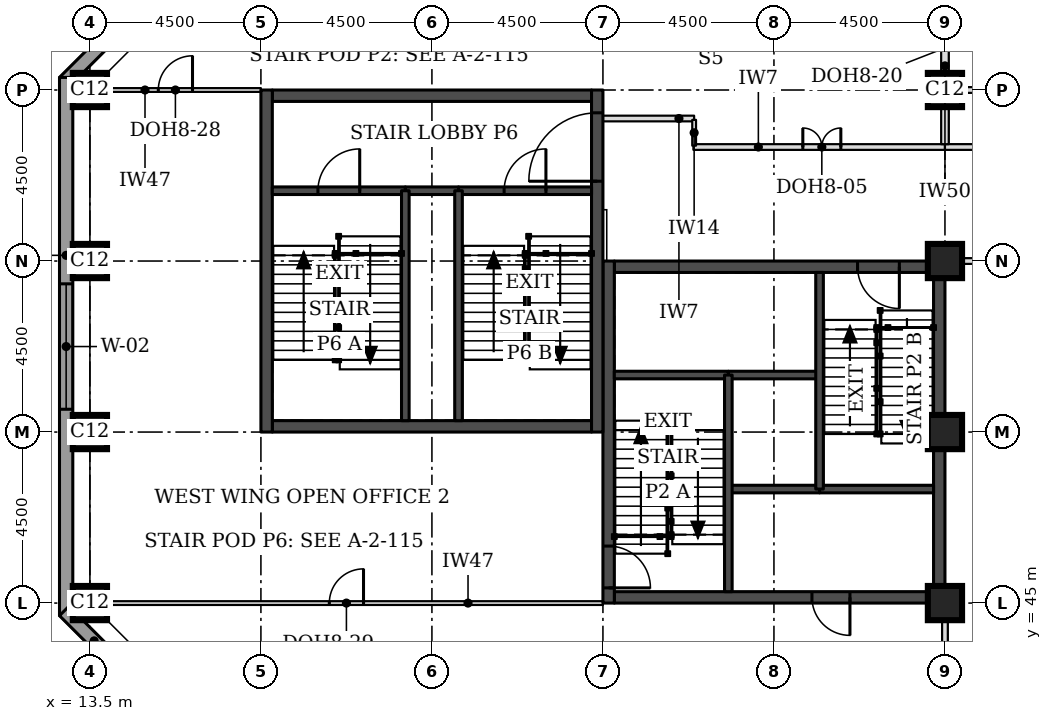
"""IFC4 building model, lengths in metres.
Left out: names, types, materials, properties, quantities, classifications, styles, units other than length and angle.
Written with IfcOpenShell. Run it as: python <this file> out.ifc"""

import sys

from ifc_helpers import new_model, si_unit, direction, frame, frame_2d, origin, origin_2d, place, context, subcontext, project, spatial, rectangle, extrude, element, fill, save


model = new_model("IFC4")
c1 = context("Model", 3, precision=1e-05, world=origin(), true_north=direction((0.0, 1.0)))
c2 = subcontext(c1, "Body", "Model", "MODEL_VIEW")
j1 = project(units=[si_unit("LENGTHUNIT", "METRE"), si_unit("PLANEANGLEUNIT", "RADIAN")], contexts=[c1])
p1 = place(None, origin())
s1 = spatial("IfcSite", under=j1, at=p1, CompositionType="ELEMENT")
p2 = place(p1, origin())
s2 = spatial("IfcBuilding", under=s1, at=p2, CompositionType="ELEMENT")
p3 = place(p2, frame((0.0, 0.0, 203.2)))
s3 = spatial("IfcBuildingStorey", under=s2, at=p3, CompositionType="ELEMENT", Elevation=203.2)
for number, where, z_axis, x_axis in (
    (1, (13.5, 45.0, 0.0), (0.0, 0.0, 1.0), (1.0, 0.0, 0.0)),
    (2, (36.0, 45.0, 0.0), (0.0, 0.0, 1.0), (1.0, 0.0, 0.0)),
    (3, (13.5, 49.5, 0.0), (0.0, 0.0, 1.0), (1.0, 0.0, 0.0)),
    (4, (36.0, 49.5, 0.0), (0.0, 0.0, 1.0), (1.0, 0.0, 0.0)),
    (5, (13.5, 54.0, 0.0), (0.0, 0.0, 1.0), (1.0, 0.0, 0.0)),
    (6, (36.0, 54.0, 0.0), (0.0, 0.0, 1.0), (1.0, 0.0, 0.0)),
    (7, (13.5, 58.5, 0.0), (0.0, 0.0, 1.0), (1.0, 0.0, 0.0)),
    (8, (36.0, 58.5, 0.0), (0.0, 0.0, 1.0), (1.0, 0.0, 0.0)),
):
    element("IfcColumn", number, at=place(p3, frame(where, z_axis=z_axis, x_axis=x_axis)), inside=s3, PredefinedType="COLUMN", context=c2, shape_type="SweptSolid", body=[
        extrude(rectangle(XDim=0.9, YDim=0.9, at=origin_2d()), origin(), (0.0, 0.0, 1.0), 3.7),
    ])
p4 = place(p3, frame((27.3, 45.15, 0.0), z_axis=(0.0, 0.0, 1.0), x_axis=(1.0, 0.0, 0.0)))
e9 = element("IfcWall", 9, at=p4, inside=s3, PredefinedType="SHEAR", context=c2, shape_type="SweptSolid", body=[
    extrude(rectangle(XDim=8.4, YDim=0.3, at=frame_2d((4.2, 0.0))), origin(), (0.0, 0.0, 1.0), 3.7),
])
p5 = place(p4, frame((5.2, 0.0, 0.0)))
e10 = element("IfcOpeningElement", 10, at=p5, cuts=e9, PredefinedType="OPENING", context=c2, shape_type="SweptSolid", body=[
    extrude(rectangle(XDim=1.0, YDim=2.1, at=frame_2d((0.5, 1.05))), frame((0.0, 0.16, 0.0), z_axis=(0.0, -1.0, 0.0), x_axis=(1.0, 0.0, 0.0)), (0.0, 0.0, 1.0), 0.32),
])
p6 = place(p3, frame((27.3, 53.85, 0.0), z_axis=(0.0, 0.0, 1.0), x_axis=(1.0, 0.0, 0.0)))
e11 = element("IfcWall", 11, at=p6, inside=s3, PredefinedType="SHEAR", context=c2, shape_type="SweptSolid", body=[
    extrude(rectangle(XDim=8.4, YDim=0.3, at=frame_2d((4.2, 0.0))), origin(), (0.0, 0.0, 1.0), 3.7),
])
p7 = place(p6, frame((6.4, 0.0, 0.0)))
e12 = element("IfcOpeningElement", 12, at=p7, cuts=e11, PredefinedType="OPENING", context=c2, shape_type="SweptSolid", body=[
    extrude(rectangle(XDim=1.1, YDim=2.1, at=frame_2d((0.55, 1.05))), frame((0.0, 0.16, 0.0), z_axis=(0.0, -1.0, 0.0), x_axis=(1.0, 0.0, 0.0)), (0.0, 0.0, 1.0), 0.32),
])
p8 = place(p3, frame((27.15, 45.0, 0.0), z_axis=(0.0, 0.0, 1.0), x_axis=(0.0, 1.0, 0.0)))
e13 = element("IfcWall", 13, at=p8, inside=s3, PredefinedType="SHEAR", context=c2, shape_type="SweptSolid", body=[
    extrude(rectangle(XDim=9.0, YDim=0.3, at=frame_2d((4.5, 0.0))), origin(), (0.0, 0.0, 1.0), 3.7),
])
p9 = place(p8, frame((0.4, 0.0, 0.0)))
e14 = element("IfcOpeningElement", 14, at=p9, cuts=e13, PredefinedType="OPENING", context=c2, shape_type="SweptSolid", body=[
    extrude(rectangle(XDim=1.1, YDim=2.1, at=frame_2d((0.55, 1.05))), frame((0.0, 0.16, 0.0), z_axis=(0.0, -1.0, 0.0), x_axis=(1.0, 0.0, 0.0)), (0.0, 0.0, 1.0), 0.32),
])
p10 = place(p3, frame((35.85, 45.0, 0.0), z_axis=(0.0, 0.0, 1.0), x_axis=(0.0, 1.0, 0.0)))
e15 = element("IfcWall", 15, at=p10, inside=s3, PredefinedType="SHEAR", context=c2, shape_type="SweptSolid", body=[
    extrude(rectangle(XDim=9.0, YDim=0.3, at=frame_2d((4.5, 0.0))), origin(), (0.0, 0.0, 1.0), 3.7),
])
for number, where, z_axis, x_axis in (
    (16, (18.3, 49.65, 0.0), (0.0, 0.0, 1.0), (1.0, 0.0, 0.0)),
    (17, (18.3, 58.35, 0.0), (0.0, 0.0, 1.0), (1.0, 0.0, 0.0)),
):
    element("IfcWall", number, at=place(p3, frame(where, z_axis=z_axis, x_axis=x_axis)), inside=s3, PredefinedType="SHEAR", context=c2, shape_type="SweptSolid", body=[
        extrude(rectangle(XDim=8.4, YDim=0.3, at=frame_2d((4.2, 0.0))), origin(), (0.0, 0.0, 1.0), 3.7),
    ])
p11 = place(p3, frame((18.15, 49.5, 0.0), z_axis=(0.0, 0.0, 1.0), x_axis=(0.0, 1.0, 0.0)))
e18 = element("IfcWall", 18, at=p11, inside=s3, PredefinedType="SHEAR", context=c2, shape_type="SweptSolid", body=[
    extrude(rectangle(XDim=9.0, YDim=0.3, at=frame_2d((4.5, 0.0))), origin(), (0.0, 0.0, 1.0), 3.7),
])
p12 = place(p3, frame((26.85, 49.5, 0.0), z_axis=(0.0, 0.0, 1.0), x_axis=(0.0, 1.0, 0.0)))
e19 = element("IfcWall", 19, at=p12, inside=s3, PredefinedType="SHEAR", context=c2, shape_type="SweptSolid", body=[
    extrude(rectangle(XDim=9.0, YDim=0.3, at=frame_2d((4.5, 0.0))), origin(), (0.0, 0.0, 1.0), 3.7),
])
p13 = place(p12, frame((6.6, 0.0, 0.0)))
e20 = element("IfcOpeningElement", 20, at=p13, cuts=e19, PredefinedType="OPENING", context=c2, shape_type="SweptSolid", body=[
    extrude(rectangle(XDim=1.8, YDim=2.1, at=frame_2d((0.9, 1.05))), frame((0.0, 0.16, 0.0), z_axis=(0.0, -1.0, 0.0), x_axis=(1.0, 0.0, 0.0)), (0.0, 0.0, 1.0), 0.32),
])
p14 = place(p3, frame((17.792, 63.676, 0.0), z_axis=(0.0, 0.0, 1.0), x_axis=(-0.707106781187, -0.707106781187, 0.0)))
e21 = element("IfcWall", 21, at=p14, inside=s3, PredefinedType="STANDARD", context=c2, shape_type="SweptSolid", body=[
    extrude(rectangle(XDim=7.027, YDim=0.35, at=frame_2d((3.513, 0.0))), origin(), (0.0, 0.0, 1.0), 3.525),
])
p15 = place(p14, frame((1.863, 0.0, 0.9)))
e22 = element("IfcOpeningElement", 22, at=p15, cuts=e21, PredefinedType="OPENING", context=c2, shape_type="SweptSolid", body=[
    extrude(rectangle(XDim=3.3, YDim=1.9, at=frame_2d((1.65, 0.95))), frame((0.0, 0.185, 0.0), z_axis=(0.0, -1.0, 0.0), x_axis=(1.0, 0.0, 0.0)), (0.0, 0.0, 1.0), 0.37),
])
p16 = place(p3, frame((12.875, 58.831, 0.0), z_axis=(0.0, 0.0, 1.0), x_axis=(0.0, -1.0, 0.0)))
e23 = element("IfcWall", 23, at=p16, inside=s3, PredefinedType="STANDARD", context=c2, shape_type="SweptSolid", body=[
    extrude(rectangle(XDim=14.163, YDim=0.35, at=frame_2d((7.081, 0.0))), origin(), (0.0, 0.0, 1.0), 3.525),
])
p17 = place(p16, frame((5.431, 0.0, 0.9)))
e24 = element("IfcOpeningElement", 24, at=p17, cuts=e23, PredefinedType="OPENING", context=c2, shape_type="SweptSolid", body=[
    extrude(rectangle(XDim=3.3, YDim=1.9, at=frame_2d((1.65, 0.95))), frame((0.0, 0.185, 0.0), z_axis=(0.0, -1.0, 0.0), x_axis=(1.0, 0.0, 0.0)), (0.0, 0.0, 1.0), 0.37),
])
p18 = place(p3, frame((12.824, 44.792, 0.0), z_axis=(0.0, 0.0, 1.0), x_axis=(0.707106781187, -0.707106781187, 0.0)))
e25 = element("IfcWall", 25, at=p18, inside=s3, PredefinedType="STANDARD", context=c2, shape_type="SweptSolid", body=[
    extrude(rectangle(XDim=7.027, YDim=0.35, at=frame_2d((3.513, 0.0))), origin(), (0.0, 0.0, 1.0), 3.525),
])
p19 = place(p18, frame((1.863, 0.0, 0.9)))
e26 = element("IfcOpeningElement", 26, at=p19, cuts=e25, PredefinedType="OPENING", context=c2, shape_type="SweptSolid", body=[
    extrude(rectangle(XDim=3.3, YDim=1.9, at=frame_2d((1.65, 0.95))), frame((0.0, 0.185, 0.0), z_axis=(0.0, -1.0, 0.0), x_axis=(1.0, 0.0, 0.0)), (0.0, 0.0, 1.0), 0.37),
])
p20 = place(p3, frame((36.45, 54.0, 0.0), z_axis=(0.0, 0.0, 1.0), x_axis=(1.0, 0.0, 0.0)))
e27 = element("IfcWall", 27, at=p20, inside=s3, PredefinedType="PARTITIONING", context=c2, shape_type="SweptSolid", body=[
    extrude(rectangle(XDim=5.625, YDim=0.15, at=frame_2d((2.812, 0.0))), origin(), (0.0, 0.0, 1.0), 3.55),
])
p21 = place(p3, frame((29.38, 57.0, 0.0), z_axis=(0.0, 0.0, 1.0), x_axis=(1.0, 0.0, 0.0)))
e28 = element("IfcWall", 28, at=p21, inside=s3, PredefinedType="PARTITIONING", context=c2, shape_type="SweptSolid", body=[
    extrude(rectangle(XDim=6.62, YDim=0.15, at=frame_2d((3.31, 0.0))), origin(), (0.0, 0.0, 1.0), 3.55),
])
p22 = place(p21, frame((2.88, 0.0, 0.0)))
e29 = element("IfcOpeningElement", 29, at=p22, cuts=e28, PredefinedType="OPENING", context=c2, shape_type="SweptSolid", body=[
    extrude(rectangle(XDim=1.0, YDim=2.1, at=frame_2d((0.5, 1.05))), frame((0.0, 0.085, 0.0), z_axis=(0.0, -1.0, 0.0), x_axis=(1.0, 0.0, 0.0)), (0.0, 0.0, 1.0), 0.17),
])
p23 = place(p3, frame((36.0, 57.0, 0.0), z_axis=(0.0, 0.0, 1.0), x_axis=(1.0, 0.0, 0.0)))
e30 = element("IfcWall", 30, at=p23, inside=s3, PredefinedType="PARTITIONING", context=c2, shape_type="SweptSolid", body=[
    extrude(rectangle(XDim=6.075, YDim=0.15, at=frame_2d((3.038, 0.0))), origin(), (0.0, 0.0, 1.0), 3.55),
])
p24 = place(p23, frame((2.55, 0.0, 0.0)))
e31 = element("IfcOpeningElement", 31, at=p24, cuts=e30, PredefinedType="OPENING", context=c2, shape_type="SweptSolid", body=[
    extrude(rectangle(XDim=1.0, YDim=2.1, at=frame_2d((0.5, 1.05))), frame((0.0, 0.085, 0.0), z_axis=(0.0, -1.0, 0.0), x_axis=(1.0, 0.0, 0.0)), (0.0, 0.0, 1.0), 0.17),
])
p25 = place(p3, frame((36.45, 58.5, 0.0), z_axis=(0.0, 0.0, 1.0), x_axis=(1.0, 0.0, 0.0)))
e32 = element("IfcWall", 32, at=p25, inside=s3, PredefinedType="PARTITIONING", context=c2, shape_type="SweptSolid", body=[
    extrude(rectangle(XDim=2.625, YDim=0.15, at=frame_2d((1.312, 0.0))), origin(), (0.0, 0.0, 1.0), 3.55),
])
p26 = place(p3, frame((36.0, 40.95, 0.0), z_axis=(0.0, 0.0, 1.0), x_axis=(0.0, 1.0, 0.0)))
e33 = element("IfcWall", 33, at=p26, inside=s3, PredefinedType="PARTITIONING", context=c2, shape_type="SweptSolid", body=[
    extrude(rectangle(XDim=3.63, YDim=0.15, at=frame_2d((1.815, 0.0))), origin(), (0.0, 0.0, 1.0), 2.8),
])
p27 = place(p26, frame((1.4, 0.0, 0.0)))
e34 = element("IfcOpeningElement", 34, at=p27, cuts=e33, PredefinedType="OPENING", context=c2, shape_type="SweptSolid", body=[
    extrude(rectangle(XDim=0.9, YDim=2.1, at=frame_2d((0.45, 1.05))), frame((0.0, 0.085, 0.0), z_axis=(0.0, -1.0, 0.0), x_axis=(1.0, 0.0, 0.0)), (0.0, 0.0, 1.0), 0.17),
])
p28 = place(p3, frame((36.0, 57.075, 0.0), z_axis=(0.0, 0.0, 1.0), x_axis=(0.0, 1.0, 0.0)))
e35 = element("IfcWall", 35, at=p28, inside=s3, PredefinedType="PARTITIONING", context=c2, shape_type="SweptSolid", body=[
    extrude(rectangle(XDim=0.975, YDim=0.2, at=frame_2d((0.488, 0.0))), origin(), (0.0, 0.0, 1.0), 2.8),
])
p29 = place(p3, frame((36.0, 58.92, 0.0), z_axis=(0.0, 0.0, 1.0), x_axis=(0.0, 1.0, 0.0)))
e36 = element("IfcWall", 36, at=p29, inside=s3, PredefinedType="PARTITIONING", context=c2, shape_type="SweptSolid", body=[
    extrude(rectangle(XDim=3.63, YDim=0.2, at=frame_2d((1.815, 0.0))), origin(), (0.0, 0.0, 1.0), 2.8),
])
p30 = place(p3, frame((13.5, 58.5, 0.0), z_axis=(0.0, 0.0, 1.0), x_axis=(1.0, 0.0, 0.0)))
e37 = element("IfcWall", 37, at=p30, inside=s3, PredefinedType="PARTITIONING", context=c2, shape_type="SweptSolid", body=[
    extrude(rectangle(XDim=4.5, YDim=0.1, at=frame_2d((2.25, 0.0))), origin(), (0.0, 0.0, 1.0), 2.55),
])
p31 = place(p30, frame((1.8, 0.0, 0.0)))
e38 = element("IfcOpeningElement", 38, at=p31, cuts=e37, PredefinedType="OPENING", context=c2, shape_type="SweptSolid", body=[
    extrude(rectangle(XDim=0.9, YDim=2.1, at=frame_2d((0.45, 1.05))), frame((0.0, 0.06, 0.0), z_axis=(0.0, -1.0, 0.0), x_axis=(1.0, 0.0, 0.0)), (0.0, 0.0, 1.0), 0.12),
])
p32 = place(p3, frame((27.0, 45.0, 0.0), z_axis=(0.0, 0.0, 1.0), x_axis=(-1.0, 0.0, 0.0)))
e39 = element("IfcWall", 39, at=p32, inside=s3, PredefinedType="PARTITIONING", context=c2, shape_type="SweptSolid", body=[
    extrude(rectangle(XDim=13.5, YDim=0.1, at=frame_2d((6.75, 0.0))), origin(), (0.0, 0.0, 1.0), 2.55),
])
p33 = place(p32, frame((6.3, 0.0, 0.0)))
e40 = element("IfcOpeningElement", 40, at=p33, cuts=e39, PredefinedType="OPENING", context=c2, shape_type="SweptSolid", body=[
    extrude(rectangle(XDim=0.9, YDim=2.1, at=frame_2d((0.45, 1.05))), frame((0.0, 0.06, 0.0), z_axis=(0.0, -1.0, 0.0), x_axis=(1.0, 0.0, 0.0)), (0.0, 0.0, 1.0), 0.12),
])
p34 = place(p3, frame((27.0, 57.75, 0.0), z_axis=(0.0, 0.0, 1.0), x_axis=(1.0, 0.0, 0.0)))
e41 = element("IfcWall", 41, at=p34, inside=s3, PredefinedType="PARTITIONING", context=c2, shape_type="SweptSolid", body=[
    extrude(rectangle(XDim=2.4, YDim=0.15, at=frame_2d((1.2, 0.0))), origin(), (0.0, 0.0, 1.0), 3.55),
])
p35 = place(p3, frame((29.4, 57.715, 0.0), z_axis=(0.0, 0.0, 1.0), x_axis=(0.0, -1.0, 0.0)))
e42 = element("IfcWall", 42, at=p35, inside=s3, PredefinedType="PARTITIONING", context=c2, shape_type="SweptSolid", body=[
    extrude(rectangle(XDim=0.68, YDim=0.1, at=frame_2d((0.34, 0.0))), origin(), (0.0, 0.0, 1.0), 3.55),
])
p36 = place(p3, frame((30.3, 48.0, 0.0), z_axis=(0.0, 0.0, 1.0), x_axis=(1.0, 0.0, 0.0)))
e43 = element("IfcWall", 43, at=p36, inside=s3, PredefinedType="SOLIDWALL", context=c2, shape_type="SweptSolid", body=[
    extrude(rectangle(XDim=2.4, YDim=0.2, at=frame_2d((1.2, 0.0))), origin(), (0.0, 0.0, 1.0), 3.55),
])
p37 = place(p3, frame((32.7, 48.0, 0.0), z_axis=(0.0, 0.0, 1.0), x_axis=(1.0, 0.0, 0.0)))
e44 = element("IfcWall", 44, at=p37, inside=s3, PredefinedType="SOLIDWALL", context=c2, shape_type="SweptSolid", body=[
    extrude(rectangle(XDim=3.0, YDim=0.2, at=frame_2d((1.5, 0.0))), origin(), (0.0, 0.0, 1.0), 3.55),
])
p38 = place(p3, frame((30.3, 51.0, 0.0), z_axis=(0.0, 0.0, 1.0), x_axis=(1.0, 0.0, 0.0)))
e45 = element("IfcWall", 45, at=p38, inside=s3, PredefinedType="SOLIDWALL", context=c2, shape_type="SweptSolid", body=[
    extrude(rectangle(XDim=2.4, YDim=0.2, at=frame_2d((1.2, 0.0))), origin(), (0.0, 0.0, 1.0), 3.7),
])
p39 = place(p3, frame((27.3, 51.0, 0.0), z_axis=(0.0, 0.0, 1.0), x_axis=(1.0, 0.0, 0.0)))
e46 = element("IfcWall", 46, at=p39, inside=s3, PredefinedType="SOLIDWALL", context=c2, shape_type="SweptSolid", body=[
    extrude(rectangle(XDim=3.0, YDim=0.2, at=frame_2d((1.5, 0.0))), origin(), (0.0, 0.0, 1.0), 3.55),
])
for number, where, z_axis, x_axis in (
    (47, (30.3, 45.3, 0.0), (0.0, 0.0, 1.0), (0.0, 1.0, 0.0)),
    (48, (32.7, 48.0, 0.0), (0.0, 0.0, 1.0), (0.0, 1.0, 0.0)),
):
    element("IfcWall", number, at=place(p3, frame(where, z_axis=z_axis, x_axis=x_axis)), inside=s3, PredefinedType="SOLIDWALL", context=c2, shape_type="SweptSolid", body=[
        extrude(rectangle(XDim=5.7, YDim=0.2, at=frame_2d((2.85, 0.0))), origin(), (0.0, 0.0, 1.0), 3.55),
    ])
p40 = place(p3, frame((21.8, 55.85, 0.0), z_axis=(0.0, 0.0, 1.0), x_axis=(1.0, 0.0, 0.0)))
e49 = element("IfcWall", 49, at=p40, inside=s3, PredefinedType="SOLIDWALL", context=c2, shape_type="SweptSolid", body=[
    extrude(rectangle(XDim=1.4, YDim=0.2, at=frame_2d((0.7, 0.0))), origin(), (0.0, 0.0, 1.0), 3.55),
])
p41 = place(p3, frame((18.3, 55.85, 0.0), z_axis=(0.0, 0.0, 1.0), x_axis=(1.0, 0.0, 0.0)))
e50 = element("IfcWall", 50, at=p41, inside=s3, PredefinedType="SOLIDWALL", context=c2, shape_type="SweptSolid", body=[
    extrude(rectangle(XDim=3.5, YDim=0.2, at=frame_2d((1.75, 0.0))), origin(), (0.0, 0.0, 1.0), 3.55),
])
p42 = place(p41, frame((1.2, 0.0, 0.0)))
e51 = element("IfcOpeningElement", 51, at=p42, cuts=e50, PredefinedType="OPENING", context=c2, shape_type="SweptSolid", body=[
    extrude(rectangle(XDim=1.1, YDim=2.1, at=frame_2d((0.55, 1.05))), frame((0.0, 0.11, 0.0), z_axis=(0.0, -1.0, 0.0), x_axis=(1.0, 0.0, 0.0)), (0.0, 0.0, 1.0), 0.22),
])
p43 = place(p3, frame((23.2, 55.85, 0.0), z_axis=(0.0, 0.0, 1.0), x_axis=(1.0, 0.0, 0.0)))
e52 = element("IfcWall", 52, at=p43, inside=s3, PredefinedType="SOLIDWALL", context=c2, shape_type="SweptSolid", body=[
    extrude(rectangle(XDim=3.5, YDim=0.2, at=frame_2d((1.75, 0.0))), origin(), (0.0, 0.0, 1.0), 3.55),
])
p44 = place(p43, frame((1.2, 0.0, 0.0)))
e53 = element("IfcOpeningElement", 53, at=p44, cuts=e52, PredefinedType="OPENING", context=c2, shape_type="SweptSolid", body=[
    extrude(rectangle(XDim=1.1, YDim=2.1, at=frame_2d((0.55, 1.05))), frame((0.0, 0.11, 0.0), z_axis=(0.0, -1.0, 0.0), x_axis=(1.0, 0.0, 0.0)), (0.0, 0.0, 1.0), 0.22),
])
for number, where, z_axis, x_axis in (
    (54, (21.8, 49.8, 0.0), (0.0, 0.0, 1.0), (0.0, 1.0, 0.0)),
    (55, (23.2, 49.8, 0.0), (0.0, 0.0, 1.0), (0.0, 1.0, 0.0)),
):
    element("IfcWall", number, at=place(p3, frame(where, z_axis=z_axis, x_axis=x_axis)), inside=s3, PredefinedType="SOLIDWALL", context=c2, shape_type="SweptSolid", body=[
        extrude(rectangle(XDim=6.05, YDim=0.2, at=frame_2d((3.025, 0.0))), origin(), (0.0, 0.0, 1.0), 3.55),
    ])
p45 = place(p17, origin())
e56 = element("IfcWindow", 56, at=p45, inside=s3, PartitioningType="SINGLE_PANEL", PredefinedType="WINDOW", context=c2, shape_type="SweptSolid", body=[
    extrude(rectangle(XDim=3.3, YDim=1.9, at=frame_2d((1.65, 0.95))), frame((0.0, 0.085, 0.0), z_axis=(0.0, -1.0, 0.0), x_axis=(1.0, 0.0, 0.0)), (0.0, 0.0, 1.0), 0.06),
])
fill(e24, e56)
p46 = place(p22, origin())
e57 = element("IfcDoor", 57, at=p46, inside=s3, OperationType="DOUBLE_DOOR_SINGLE_SWING", PredefinedType="DOOR", context=c2, shape_type="SweptSolid", body=[
    extrude(rectangle(XDim=1.0, YDim=2.1, at=frame_2d((0.5, 1.05))), frame((0.0, 0.025, 0.0), z_axis=(0.0, -1.0, 0.0), x_axis=(1.0, 0.0, 0.0)), (0.0, 0.0, 1.0), 0.05),
])
fill(e29, e57)
p47 = place(p31, origin())
e58 = element("IfcDoor", 58, at=p47, inside=s3, OperationType="SINGLE_SWING_RIGHT", PredefinedType="DOOR", context=c2, shape_type="SweptSolid", body=[
    extrude(rectangle(XDim=0.9, YDim=2.1, at=frame_2d((0.45, 1.05))), frame((0.0, 0.025, 0.0), z_axis=(0.0, -1.0, 0.0), x_axis=(1.0, 0.0, 0.0)), (0.0, 0.0, 1.0), 0.05),
])
fill(e38, e58)
p48 = place(p33, frame((0.9, 0.0, 0.0), z_axis=(0.0, 0.0, 1.0), x_axis=(-1.0, 0.0, 0.0)))
e59 = element("IfcDoor", 59, at=p48, inside=s3, OperationType="SINGLE_SWING_RIGHT", PredefinedType="DOOR", context=c2, shape_type="SweptSolid", body=[
    extrude(rectangle(XDim=0.9, YDim=2.1, at=frame_2d((0.45, 1.05))), frame((0.0, 0.025, 0.0), z_axis=(0.0, -1.0, 0.0), x_axis=(1.0, 0.0, 0.0)), (0.0, 0.0, 1.0), 0.05),
])
fill(e40, e59)
p49 = place(p9, frame((1.1, 0.0, 0.0), z_axis=(0.0, 0.0, 1.0), x_axis=(-1.0, 0.0, 0.0)))
e60 = element("IfcDoor", 60, at=p49, inside=s3, OperationType="SINGLE_SWING_RIGHT", PredefinedType="DOOR", context=c2, shape_type="SweptSolid", body=[
    extrude(rectangle(XDim=1.1, YDim=2.1, at=frame_2d((0.55, 1.05))), frame((0.0, 0.025, 0.0), z_axis=(0.0, -1.0, 0.0), x_axis=(1.0, 0.0, 0.0)), (0.0, 0.0, 1.0), 0.05),
])
fill(e14, e60)
p50 = place(p7, frame((1.1, 0.0, 0.0), z_axis=(0.0, 0.0, 1.0), x_axis=(-1.0, 0.0, 0.0)))
e61 = element("IfcDoor", 61, at=p50, inside=s3, OperationType="SINGLE_SWING_LEFT", PredefinedType="DOOR", context=c2, shape_type="SweptSolid", body=[
    extrude(rectangle(XDim=1.1, YDim=2.1, at=frame_2d((0.55, 1.05))), frame((0.0, 0.025, 0.0), z_axis=(0.0, -1.0, 0.0), x_axis=(1.0, 0.0, 0.0)), (0.0, 0.0, 1.0), 0.05),
])
fill(e12, e61)
p51 = place(p5, frame((1.0, 0.0, 0.0), z_axis=(0.0, 0.0, 1.0), x_axis=(-1.0, 0.0, 0.0)))
e62 = element("IfcDoor", 62, at=p51, inside=s3, OperationType="SINGLE_SWING_LEFT", PredefinedType="DOOR", context=c2, shape_type="SweptSolid", body=[
    extrude(rectangle(XDim=1.0, YDim=2.1, at=frame_2d((0.5, 1.05))), frame((0.0, 0.025, 0.0), z_axis=(0.0, -1.0, 0.0), x_axis=(1.0, 0.0, 0.0)), (0.0, 0.0, 1.0), 0.05),
])
fill(e10, e62)
p52 = place(p42, origin())
e63 = element("IfcDoor", 63, at=p52, inside=s3, OperationType="SINGLE_SWING_RIGHT", PredefinedType="DOOR", context=c2, shape_type="SweptSolid", body=[
    extrude(rectangle(XDim=1.1, YDim=2.1, at=frame_2d((0.55, 1.05))), frame((0.0, 0.025, 0.0), z_axis=(0.0, -1.0, 0.0), x_axis=(1.0, 0.0, 0.0)), (0.0, 0.0, 1.0), 0.05),
])
fill(e51, e63)
p53 = place(p44, origin())
e64 = element("IfcDoor", 64, at=p53, inside=s3, OperationType="SINGLE_SWING_RIGHT", PredefinedType="DOOR", context=c2, shape_type="SweptSolid", body=[
    extrude(rectangle(XDim=1.1, YDim=2.1, at=frame_2d((0.55, 1.05))), frame((0.0, 0.025, 0.0), z_axis=(0.0, -1.0, 0.0), x_axis=(1.0, 0.0, 0.0)), (0.0, 0.0, 1.0), 0.05),
])
fill(e53, e64)
p54 = place(p13, origin())
e65 = element("IfcDoor", 65, at=p54, inside=s3, OperationType="SINGLE_SWING_LEFT", PredefinedType="DOOR", context=c2, shape_type="SweptSolid", body=[
    extrude(rectangle(XDim=1.8, YDim=2.1, at=frame_2d((0.9, 1.05))), frame((0.0, 0.025, 0.0), z_axis=(0.0, -1.0, 0.0), x_axis=(1.0, 0.0, 0.0)), (0.0, 0.0, 1.0), 0.05),
])
fill(e20, e65)
save(model, sys.argv[1])
